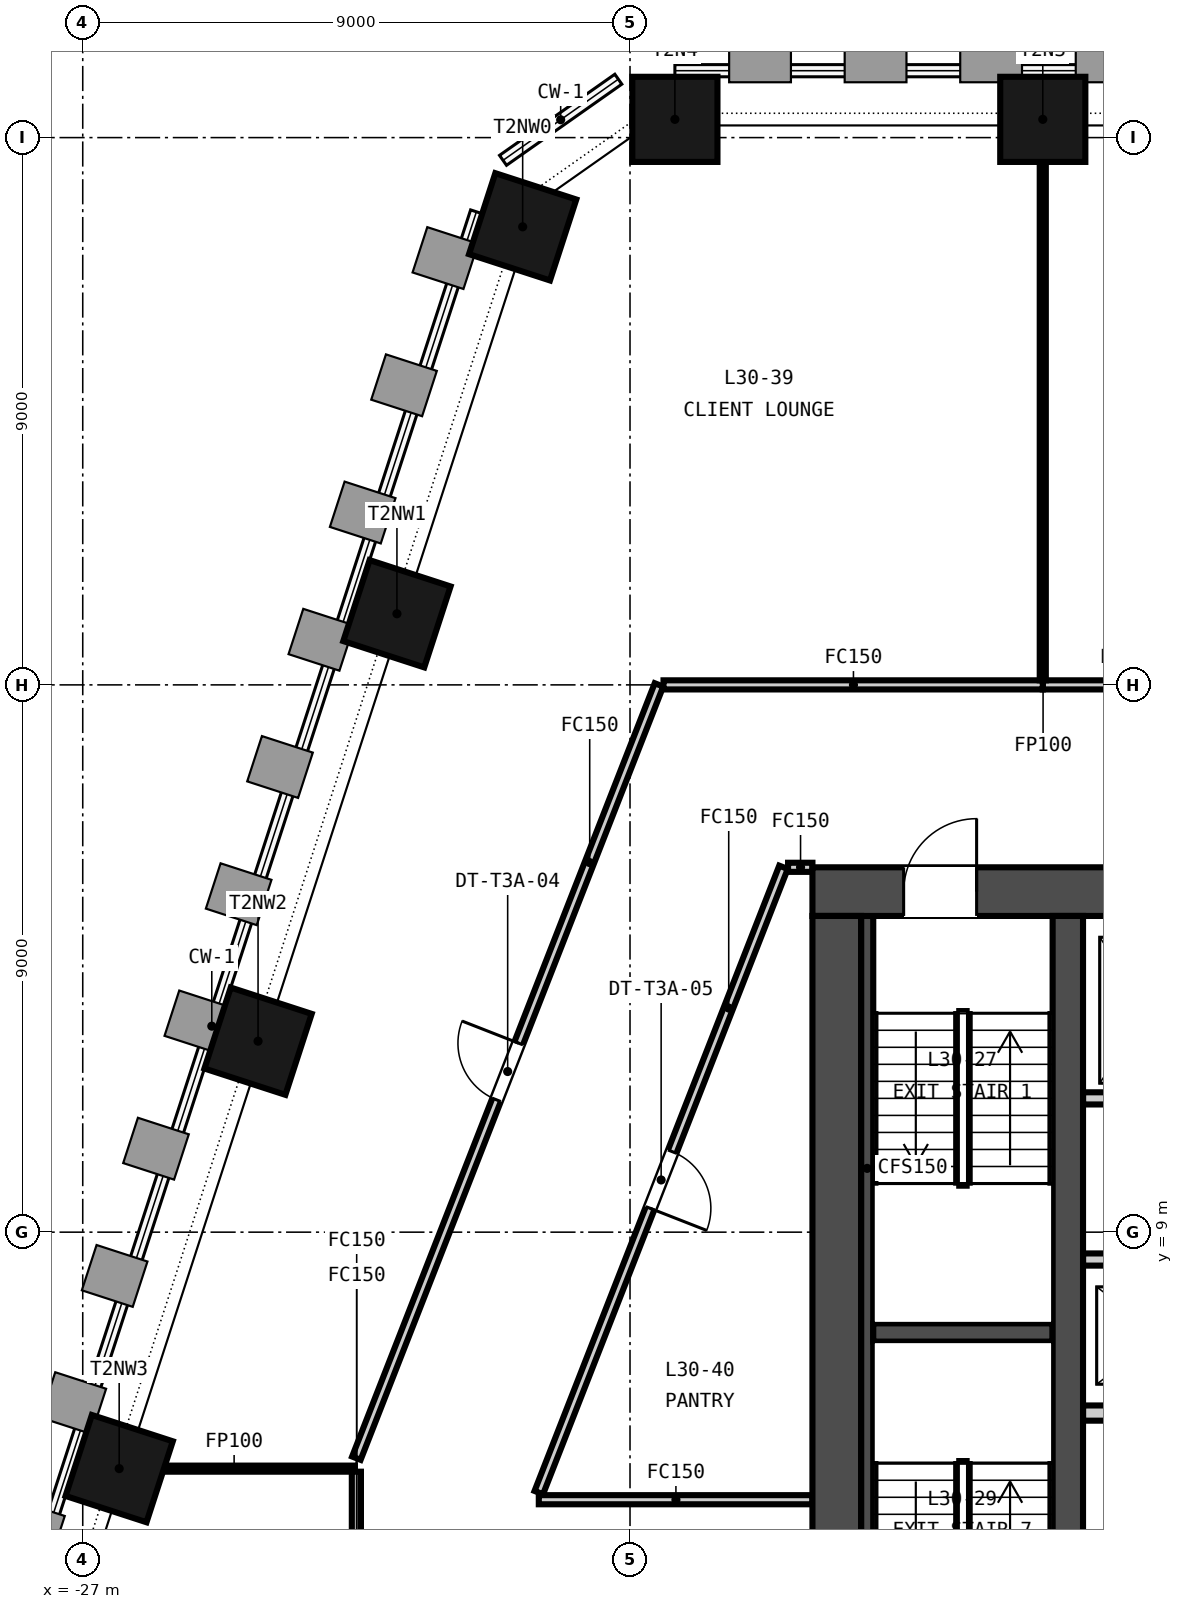
"""IFC4 building model, lengths in metres.
Left out: names, types, materials, properties, quantities, classifications, styles, units other than length and angle.
Written with IfcOpenShell. Run it as: python <this file> out.ifc"""

import sys

from ifc_helpers import new_model, si_unit, direction, frame, frame_2d, origin, origin_2d, place, context, subcontext, project, spatial, rectangle, extrude, element, fill, save


model = new_model("IFC4")
c1 = context("Model", 3, precision=1e-05, world=origin(), true_north=direction((0.0, 1.0)))
c2 = subcontext(c1, "Body", "Model", "MODEL_VIEW")
j1 = project(units=[si_unit("LENGTHUNIT", "METRE"), si_unit("PLANEANGLEUNIT", "RADIAN")], contexts=[c1])
p1 = place(None, origin())
s1 = spatial("IfcSite", under=j1, at=p1, CompositionType="ELEMENT")
p2 = place(p1, origin())
s2 = spatial("IfcBuilding", under=s1, at=p2, CompositionType="ELEMENT")
p3 = place(p2, frame((0.0, 0.0, 126.15)))
s3 = spatial("IfcBuildingStorey", under=s2, at=p3, CompositionType="ELEMENT", Elevation=126.15)
p4 = place(p3, frame((-15.0, 14.6, -0.15), z_axis=(0.0, 0.0, 1.0), x_axis=(1.0, 0.0, 0.0)))
e1 = element("IfcWall", 1, at=p4, inside=s3, PredefinedType="SOLIDWALL", context=c2, shape_type="SweptSolid", body=[
    extrude(rectangle(XDim=30.0, YDim=0.8, at=frame_2d((15.0, 0.0))), origin(), (0.0, 0.0, 1.0), 3.65),
])
p5 = place(p4, frame((9.25, 0.0, 0.15)))
e2 = element("IfcOpeningElement", 2, at=p5, cuts=e1, PredefinedType="OPENING", context=c2, shape_type="SweptSolid", body=[
    extrude(rectangle(XDim=1.5, YDim=2.1, at=frame_2d((0.75, 1.05))), frame((0.0, 0.41, 0.0), z_axis=(0.0, -1.0, 0.0), x_axis=(1.0, 0.0, 0.0)), (0.0, 0.0, 1.0), 0.82),
])
p6 = place(p4, frame((19.4, 0.0, 0.15)))
e3 = element("IfcOpeningElement", 3, at=p6, cuts=e1, PredefinedType="OPENING", context=c2, shape_type="SweptSolid", body=[
    extrude(rectangle(XDim=1.5, YDim=2.1, at=frame_2d((0.75, 1.05))), frame((0.0, 0.41, 0.0), z_axis=(0.0, -1.0, 0.0), x_axis=(1.0, 0.0, 0.0)), (0.0, 0.0, 1.0), 0.82),
])
p7 = place(p4, frame((1.5, 0.0, 0.15)))
e4 = element("IfcOpeningElement", 4, at=p7, cuts=e1, PredefinedType="OPENING", context=c2, shape_type="SweptSolid", body=[
    extrude(rectangle(XDim=1.2, YDim=2.1, at=frame_2d((0.6, 1.05))), frame((0.0, 0.41, 0.0), z_axis=(0.0, -1.0, 0.0), x_axis=(1.0, 0.0, 0.0)), (0.0, 0.0, 1.0), 0.82),
])
p8 = place(p4, frame((27.3, 0.0, 0.15)))
e5 = element("IfcOpeningElement", 5, at=p8, cuts=e1, PredefinedType="OPENING", context=c2, shape_type="SweptSolid", body=[
    extrude(rectangle(XDim=1.2, YDim=2.1, at=frame_2d((0.6, 1.05))), frame((0.0, 0.41, 0.0), z_axis=(0.0, -1.0, 0.0), x_axis=(1.0, 0.0, 0.0)), (0.0, 0.0, 1.0), 0.82),
])
p9 = place(p3, frame((-14.6, 0.8, -0.15), z_axis=(0.0, 0.0, 1.0), x_axis=(0.0, 1.0, 0.0)))
e6 = element("IfcWall", 6, at=p9, inside=s3, PredefinedType="SOLIDWALL", context=c2, shape_type="SweptSolid", body=[
    extrude(rectangle(XDim=13.4, YDim=0.8, at=frame_2d((6.7, 0.0))), origin(), (0.0, 0.0, 1.0), 3.65),
])
p10 = place(p3, frame((-10.8, 0.8, -0.15), z_axis=(0.0, 0.0, 1.0), x_axis=(0.0, 1.0, 0.0)))
e7 = element("IfcWall", 7, at=p10, inside=s3, PredefinedType="SOLIDWALL", context=c2, shape_type="SweptSolid", body=[
    extrude(rectangle(XDim=13.4, YDim=0.5, at=frame_2d((6.7, 0.0))), origin(), (0.0, 0.0, 1.0), 3.65),
])
for number, where, z_axis, x_axis in (
    (8, (-11.212, 27.3, -0.15), (0.0, 0.0, 1.0), (-1.0, 0.0, 0.0)),
    (9, (-17.262, 27.3, -0.15), (0.0, 0.0, 1.0), (-1.0, 0.0, 0.0)),
    (10, (-19.765, 25.533, -0.15), (0.0, 0.0, 1.0), (-0.309, -0.951, 0.0)),
    (11, (-21.833, 19.17, -0.15), (0.0, 0.0, 1.0), (-0.309, -0.951, 0.0)),
    (12, (-24.117, 12.141, -0.15), (0.0, 0.0, 1.0), (-0.309, -0.951, 0.0)),
    (13, (-26.401, 5.111, -0.15), (0.0, 0.0, 1.0), (-0.309, -0.951, 0.0)),
):
    element("IfcColumn", number, at=place(p3, frame(where, z_axis=z_axis, x_axis=x_axis)), inside=s3, PredefinedType="COLUMN", context=c2, shape_type="SweptSolid", body=[
        extrude(rectangle(XDim=1.4, YDim=1.4, at=origin_2d()), origin(), (0.0, 0.0, 1.0), 3.65),
    ])
p11 = place(p3, frame((-10.55, 6.025, 0.0), z_axis=(0.0, 0.0, 1.0), x_axis=(1.0, 0.0, 0.0)))
e14 = element("IfcWall", 14, at=p11, inside=s3, PredefinedType="PARTITIONING", context=c2, shape_type="SweptSolid", body=[
    extrude(rectangle(XDim=21.1, YDim=0.25, at=frame_2d((10.55, 0.0))), origin(), (0.0, 0.0, 1.0), 3.5),
])
p12 = place(p3, frame((-10.55, 8.55, 0.0), z_axis=(0.0, 0.0, 1.0), x_axis=(1.0, 0.0, 0.0)))
e15 = element("IfcWall", 15, at=p12, inside=s3, PredefinedType="PARTITIONING", context=c2, shape_type="SweptSolid", body=[
    extrude(rectangle(XDim=21.1, YDim=0.2, at=frame_2d((10.55, 0.0))), origin(), (0.0, 0.0, 1.0), 3.5),
])
p13 = place(p12, frame((0.675, 0.0, 0.0)))
e16 = element("IfcOpeningElement", 16, at=p13, cuts=e15, PredefinedType="OPENING", context=c2, shape_type="SweptSolid", body=[
    extrude(rectangle(XDim=1.2, YDim=2.1, at=frame_2d((0.6, 1.05))), frame((0.0, 0.11, 0.0), z_axis=(0.0, -1.0, 0.0), x_axis=(1.0, 0.0, 0.0)), (0.0, 0.0, 1.0), 0.22),
])
p14 = place(p12, frame((3.475, 0.0, 0.0)))
e17 = element("IfcOpeningElement", 17, at=p14, cuts=e15, PredefinedType="OPENING", context=c2, shape_type="SweptSolid", body=[
    extrude(rectangle(XDim=1.2, YDim=2.1, at=frame_2d((0.6, 1.05))), frame((0.0, 0.11, 0.0), z_axis=(0.0, -1.0, 0.0), x_axis=(1.0, 0.0, 0.0)), (0.0, 0.0, 1.0), 0.22),
])
p15 = place(p12, frame((6.275, 0.0, 0.0)))
e18 = element("IfcOpeningElement", 18, at=p15, cuts=e15, PredefinedType="OPENING", context=c2, shape_type="SweptSolid", body=[
    extrude(rectangle(XDim=1.2, YDim=2.1, at=frame_2d((0.6, 1.05))), frame((0.0, 0.11, 0.0), z_axis=(0.0, -1.0, 0.0), x_axis=(1.0, 0.0, 0.0)), (0.0, 0.0, 1.0), 0.22),
])
p16 = place(p12, frame((9.075, 0.0, 0.0)))
e19 = element("IfcOpeningElement", 19, at=p16, cuts=e15, PredefinedType="OPENING", context=c2, shape_type="SweptSolid", body=[
    extrude(rectangle(XDim=1.2, YDim=2.1, at=frame_2d((0.6, 1.05))), frame((0.0, 0.11, 0.0), z_axis=(0.0, -1.0, 0.0), x_axis=(1.0, 0.0, 0.0)), (0.0, 0.0, 1.0), 0.22),
])
p17 = place(p12, frame((11.875, 0.0, 0.0)))
e20 = element("IfcOpeningElement", 20, at=p17, cuts=e15, PredefinedType="OPENING", context=c2, shape_type="SweptSolid", body=[
    extrude(rectangle(XDim=1.2, YDim=2.1, at=frame_2d((0.6, 1.05))), frame((0.0, 0.11, 0.0), z_axis=(0.0, -1.0, 0.0), x_axis=(1.0, 0.0, 0.0)), (0.0, 0.0, 1.0), 0.22),
])
p18 = place(p12, frame((14.675, 0.0, 0.0)))
e21 = element("IfcOpeningElement", 21, at=p18, cuts=e15, PredefinedType="OPENING", context=c2, shape_type="SweptSolid", body=[
    extrude(rectangle(XDim=1.2, YDim=2.1, at=frame_2d((0.6, 1.05))), frame((0.0, 0.11, 0.0), z_axis=(0.0, -1.0, 0.0), x_axis=(1.0, 0.0, 0.0)), (0.0, 0.0, 1.0), 0.22),
])
p19 = place(p12, frame((17.475, 0.0, 0.0)))
e22 = element("IfcOpeningElement", 22, at=p19, cuts=e15, PredefinedType="OPENING", context=c2, shape_type="SweptSolid", body=[
    extrude(rectangle(XDim=1.2, YDim=2.1, at=frame_2d((0.6, 1.05))), frame((0.0, 0.11, 0.0), z_axis=(0.0, -1.0, 0.0), x_axis=(1.0, 0.0, 0.0)), (0.0, 0.0, 1.0), 0.22),
])
p20 = place(p12, frame((19.9, 0.0, 0.0)))
e23 = element("IfcOpeningElement", 23, at=p20, cuts=e15, PredefinedType="OPENING", context=c2, shape_type="SweptSolid", body=[
    extrude(rectangle(XDim=0.9, YDim=2.1, at=frame_2d((0.45, 1.05))), frame((0.0, 0.11, 0.0), z_axis=(0.0, -1.0, 0.0), x_axis=(1.0, 0.0, 0.0)), (0.0, 0.0, 1.0), 0.22),
])
p21 = place(p3, frame((-10.55, 11.2, 0.0), z_axis=(0.0, 0.0, 1.0), x_axis=(1.0, 0.0, 0.0)))
e24 = element("IfcWall", 24, at=p21, inside=s3, PredefinedType="PARTITIONING", context=c2, shape_type="SweptSolid", body=[
    extrude(rectangle(XDim=4.8, YDim=0.2, at=frame_2d((2.4, 0.0))), origin(), (0.0, 0.0, 1.0), 3.5),
])
p22 = place(p21, frame((0.525, 0.0, 0.0)))
e25 = element("IfcOpeningElement", 25, at=p22, cuts=e24, PredefinedType="OPENING", context=c2, shape_type="SweptSolid", body=[
    extrude(rectangle(XDim=1.1, YDim=2.1, at=frame_2d((0.55, 1.05))), frame((0.0, 0.11, 0.0), z_axis=(0.0, -1.0, 0.0), x_axis=(1.0, 0.0, 0.0)), (0.0, 0.0, 1.0), 0.22),
])
p23 = place(p21, frame((2.925, 0.0, 0.0)))
e26 = element("IfcOpeningElement", 26, at=p23, cuts=e24, PredefinedType="OPENING", context=c2, shape_type="SweptSolid", body=[
    extrude(rectangle(XDim=1.1, YDim=2.1, at=frame_2d((0.55, 1.05))), frame((0.0, 0.11, 0.0), z_axis=(0.0, -1.0, 0.0), x_axis=(1.0, 0.0, 0.0)), (0.0, 0.0, 1.0), 0.22),
])
p24 = place(p3, frame((-14.0, 7.35, 0.0), z_axis=(0.0, 0.0, 1.0), x_axis=(1.0, 0.0, 0.0)))
e27 = element("IfcWall", 27, at=p24, inside=s3, PredefinedType="SOLIDWALL", context=c2, shape_type="SweptSolid", body=[
    extrude(rectangle(XDim=2.95, YDim=0.3, at=frame_2d((1.475, 0.0))), origin(), (0.0, 0.0, 1.0), 3.5),
])
p25 = place(p3, frame((-14.1, 0.8, 0.0), z_axis=(0.0, 0.0, 1.0), x_axis=(0.0, 1.0, 0.0)))
e28 = element("IfcWall", 28, at=p25, inside=s3, PredefinedType="SOLIDWALL", context=c2, shape_type="SweptSolid", body=[
    extrude(rectangle(XDim=13.4, YDim=0.2, at=frame_2d((6.7, 0.0))), origin(), (0.0, 0.0, 1.0), 3.5),
])
p26 = place(p3, frame((-15.476, 15.0, 0.0), z_axis=(0.0, 0.0, 1.0), x_axis=(-0.364411853206, -0.931237886494, 0.0)))
e29 = element("IfcWall", 29, at=p26, inside=s3, PredefinedType="PARTITIONING", context=c2, shape_type="SweptSolid", body=[
    extrude(rectangle(XDim=11.042, YDim=0.15, at=frame_2d((5.521, 0.0))), origin(), (0.0, 0.0, 1.0), 2.741),
])
p27 = place(p26, frame((5.021, 0.0, 0.0)))
e30 = element("IfcOpeningElement", 30, at=p27, cuts=e29, PredefinedType="OPENING", context=c2, shape_type="SweptSolid", body=[
    extrude(rectangle(XDim=1.0, YDim=2.1, at=frame_2d((0.5, 1.05))), frame((0.0, 0.085, 0.0), z_axis=(0.0, -1.0, 0.0), x_axis=(1.0, 0.0, 0.0)), (0.0, 0.0, 1.0), 0.17),
])
p28 = place(p3, frame((-15.0, 15.0, 0.0), z_axis=(0.0, 0.0, 1.0), x_axis=(-1.0, 0.0, 0.0)))
e31 = element("IfcWall", 31, at=p28, inside=s3, PredefinedType="PARTITIONING", context=c2, shape_type="SweptSolid", body=[
    extrude(rectangle(XDim=0.401, YDim=0.15, at=frame_2d((0.2, 0.0))), origin(), (0.0, 0.0, 1.0), 2.741),
])
p29 = place(p3, frame((-11.212, 18.0, 0.0), z_axis=(0.0, 0.0, 1.0), x_axis=(1.0, 0.0, 0.0)))
e32 = element("IfcWall", 32, at=p29, inside=s3, PredefinedType="PARTITIONING", context=c2, shape_type="SweptSolid", body=[
    extrude(rectangle(XDim=6.75, YDim=0.15, at=frame_2d((3.375, 0.0))), origin(), (0.0, 0.0, 1.0), 2.741),
])
p30 = place(p29, frame((2.875, 0.0, 0.0)))
e33 = element("IfcOpeningElement", 33, at=p30, cuts=e32, PredefinedType="OPENING", context=c2, shape_type="SweptSolid", body=[
    extrude(rectangle(XDim=1.0, YDim=2.1, at=frame_2d((0.5, 1.05))), frame((0.0, 0.085, 0.0), z_axis=(0.0, -1.0, 0.0), x_axis=(1.0, 0.0, 0.0)), (0.0, 0.0, 1.0), 0.17),
])
p31 = place(p3, frame((-22.5, 5.283, 0.0), z_axis=(0.0, 0.0, 1.0), x_axis=(0.364389237236, 0.931246736256, 0.0)))
e34 = element("IfcWall", 34, at=p31, inside=s3, PredefinedType="PARTITIONING", context=c2, shape_type="SweptSolid", body=[
    extrude(rectangle(XDim=13.656, YDim=0.15, at=frame_2d((6.828, 0.0))), origin(), (0.0, 0.0, 1.0), 2.741),
])
p32 = place(p31, frame((6.328, 0.0, 0.0)))
e35 = element("IfcOpeningElement", 35, at=p32, cuts=e34, PredefinedType="OPENING", context=c2, shape_type="SweptSolid", body=[
    extrude(rectangle(XDim=1.0, YDim=2.1, at=frame_2d((0.5, 1.05))), frame((0.0, 0.085, 0.0), z_axis=(0.0, -1.0, 0.0), x_axis=(1.0, 0.0, 0.0)), (0.0, 0.0, 1.0), 0.17),
])
p33 = place(p3, frame((-17.449, 18.0, 0.0), z_axis=(0.0, 0.0, 1.0), x_axis=(1.0, 0.0, 0.0)))
e36 = element("IfcWall", 36, at=p33, inside=s3, PredefinedType="PARTITIONING", context=c2, shape_type="SweptSolid", body=[
    extrude(rectangle(XDim=6.237, YDim=0.15, at=frame_2d((3.119, 0.0))), origin(), (0.0, 0.0, 1.0), 2.741),
])
p34 = place(p3, frame((-11.212, 18.075, 0.0), z_axis=(0.0, 0.0, 1.0), x_axis=(0.0, 1.0, 0.0)))
e37 = element("IfcWall", 37, at=p34, inside=s3, PredefinedType="PARTITIONING", context=c2, shape_type="SweptSolid", body=[
    extrude(rectangle(XDim=9.325, YDim=0.1, at=frame_2d((4.663, 0.0))), origin(), (0.0, 0.0, 1.0), 2.741),
])
p35 = place(p3, frame((-26.506, 5.111, 0.0), z_axis=(0.0, 0.0, 1.0), x_axis=(1.0, 0.0, 0.0)))
e38 = element("IfcWall", 38, at=p35, inside=s3, PredefinedType="PARTITIONING", context=c2, shape_type="SweptSolid", body=[
    extrude(rectangle(XDim=3.981, YDim=0.1, at=frame_2d((1.991, 0.0))), origin(), (0.0, 0.0, 1.0), 2.741),
])
p36 = place(p3, frame((-19.5, 4.6, 0.0), z_axis=(0.0, 0.0, 1.0), x_axis=(1.0, 0.0, 0.0)))
e39 = element("IfcWall", 39, at=p36, inside=s3, PredefinedType="PARTITIONING", context=c2, shape_type="SweptSolid", body=[
    extrude(rectangle(XDim=4.5, YDim=0.15, at=frame_2d((2.25, 0.0))), origin(), (0.0, 0.0, 1.0), 2.741),
])
p37 = place(p3, frame((-22.5, 0.0, 0.0), z_axis=(0.0, 0.0, 1.0), x_axis=(0.0, 1.0, 0.0)))
e40 = element("IfcWall", 40, at=p37, inside=s3, PredefinedType="PARTITIONING", context=c2, shape_type="SweptSolid", body=[
    extrude(rectangle(XDim=5.061, YDim=0.15, at=frame_2d((2.531, 0.0))), origin(), (0.0, 0.0, 1.0), 2.741),
])
p38 = place(p7, origin())
e41 = element("IfcDoor", 41, at=p38, inside=s3, OperationType="SINGLE_SWING_RIGHT", PredefinedType="DOOR", context=c2, shape_type="SweptSolid", body=[
    extrude(rectangle(XDim=1.2, YDim=2.1, at=frame_2d((0.6, 1.05))), frame((0.0, 0.025, 0.0), z_axis=(0.0, -1.0, 0.0), x_axis=(1.0, 0.0, 0.0)), (0.0, 0.0, 1.0), 0.05),
])
fill(e4, e41)
p39 = place(p32, origin())
e42 = element("IfcDoor", 42, at=p39, inside=s3, OperationType="SINGLE_SWING_RIGHT", PredefinedType="DOOR", context=c2, shape_type="SweptSolid", body=[
    extrude(rectangle(XDim=1.0, YDim=2.1, at=frame_2d((0.5, 1.05))), frame((0.0, 0.025, 0.0), z_axis=(0.0, -1.0, 0.0), x_axis=(1.0, 0.0, 0.0)), (0.0, 0.0, 1.0), 0.05),
])
fill(e35, e42)
p40 = place(p27, origin())
e43 = element("IfcDoor", 43, at=p40, inside=s3, OperationType="SINGLE_SWING_RIGHT", PredefinedType="DOOR", context=c2, shape_type="SweptSolid", body=[
    extrude(rectangle(XDim=1.0, YDim=2.1, at=frame_2d((0.5, 1.05))), frame((0.0, 0.025, 0.0), z_axis=(0.0, -1.0, 0.0), x_axis=(1.0, 0.0, 0.0)), (0.0, 0.0, 1.0), 0.05),
])
fill(e30, e43)
save(model, sys.argv[1])
